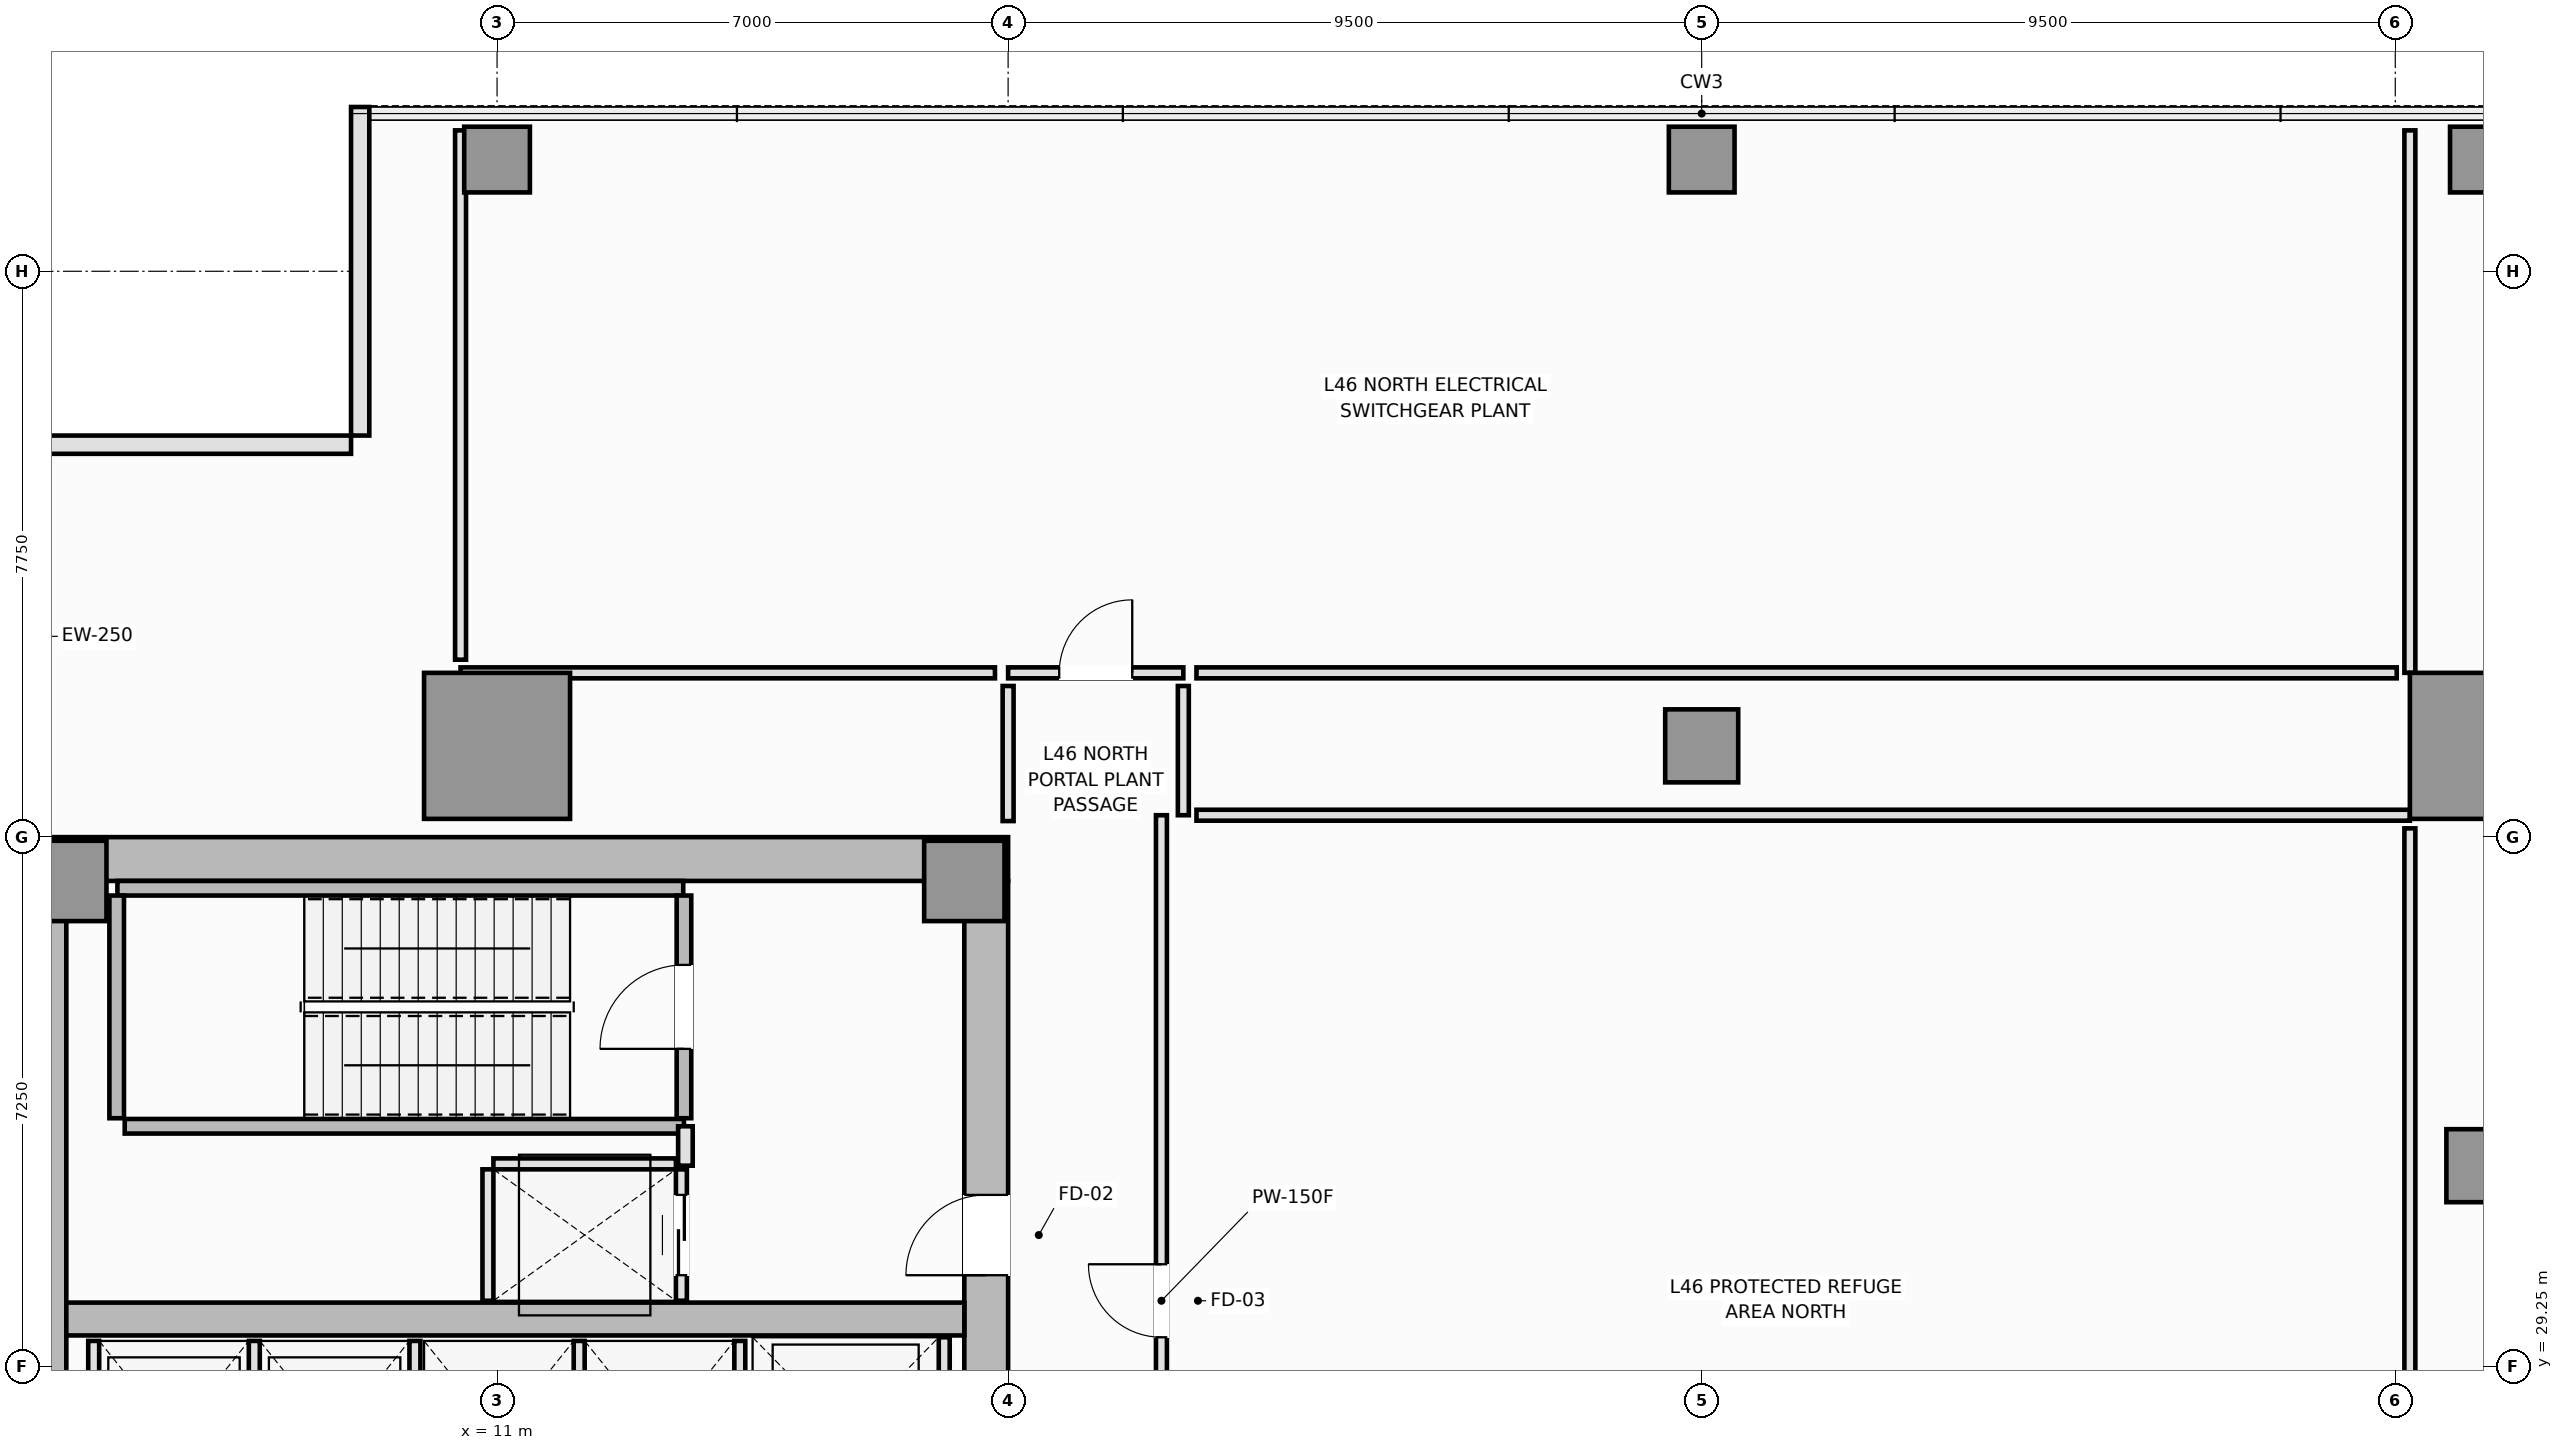
"""IFC4 building model, lengths in metres.
Left out: names, types, materials, properties, quantities, classifications, styles, units other than length and angle.
Written with IfcOpenShell. Run it as: python <this file> out.ifc"""

import sys

from ifc_helpers import new_model, si_unit, direction, frame, frame_2d, origin, origin_2d, place, context, subcontext, project, spatial, rectangle, extrude, element, fill, save


model = new_model("IFC4")
c1 = context("Model", 3, precision=1e-05, world=origin(), true_north=direction((0.0, 1.0)))
c2 = subcontext(c1, "Body", "Model", "MODEL_VIEW")
j1 = project(units=[si_unit("LENGTHUNIT", "METRE"), si_unit("PLANEANGLEUNIT", "RADIAN")], contexts=[c1])
p1 = place(None, origin())
s1 = spatial("IfcSite", under=j1, at=p1, CompositionType="ELEMENT")
p2 = place(p1, origin())
s2 = spatial("IfcBuilding", under=s1, at=p2, CompositionType="ELEMENT")
p3 = place(p2, frame((0.0, 0.0, 173.25)))
s3 = spatial("IfcBuildingStorey", under=s2, at=p3, CompositionType="ELEMENT", Elevation=173.25)
p4 = place(p3, frame((4.5, 36.2, 0.0), z_axis=(0.0, 0.0, 1.0), x_axis=(1.0, 0.0, 0.0)))
e1 = element("IfcWall", 1, at=p4, inside=s3, PredefinedType="SHEAR", context=c2, shape_type="SweptSolid", body=[
    extrude(rectangle(XDim=13.5, YDim=0.6, at=frame_2d((6.75, 0.0))), origin(), (0.0, 0.0, 1.0), 4.8),
])
p5 = place(p3, frame((4.8, 14.6, 0.0), z_axis=(0.0, 0.0, 1.0), x_axis=(0.0, 1.0, 0.0)))
e2 = element("IfcWall", 2, at=p5, inside=s3, PredefinedType="SHEAR", context=c2, shape_type="SweptSolid", body=[
    extrude(rectangle(XDim=21.3, YDim=0.6, at=frame_2d((10.65, 0.0))), origin(), (0.0, 0.0, 1.0), 4.8),
])
p6 = place(p3, frame((17.7, 27.05, 0.0), z_axis=(0.0, 0.0, 1.0), x_axis=(0.0, 1.0, 0.0)))
e3 = element("IfcWall", 3, at=p6, inside=s3, PredefinedType="SHEAR", context=c2, shape_type="SweptSolid", body=[
    extrude(rectangle(XDim=8.85, YDim=0.6, at=frame_2d((4.425, 0.0))), origin(), (0.0, 0.0, 1.0), 4.8),
])
p7 = place(p6, frame((3.45, 0.0, 0.0)))
e4 = element("IfcOpeningElement", 4, at=p7, cuts=e3, PredefinedType="OPENING", context=c2, shape_type="SweptSolid", body=[
    extrude(rectangle(XDim=1.1, YDim=2.15, at=frame_2d((0.55, 1.075))), frame((0.0, 0.31, 0.0), z_axis=(0.0, -1.0, 0.0), x_axis=(1.0, 0.0, 0.0)), (0.0, 0.0, 1.0), 0.62),
])
p8 = place(p3, frame((5.1, 29.9, 0.0), z_axis=(0.0, 0.0, 1.0), x_axis=(1.0, 0.0, 0.0)))
e5 = element("IfcWall", 5, at=p8, inside=s3, PredefinedType="SHEAR", context=c2, shape_type="SweptSolid", body=[
    extrude(rectangle(XDim=12.3, YDim=0.45, at=frame_2d((6.15, 0.0))), origin(), (0.0, 0.0, 1.0), 4.8),
])
for number, where, z_axis, x_axis in (
    (6, (5.1, 35.9, 0.0), (0.0, 0.0, 1.0), (1.0, 0.0, 0.0)),
    (7, (17.4, 35.9, 0.0), (0.0, 0.0, 1.0), (1.0, 0.0, 0.0)),
):
    element("IfcColumn", number, at=place(p3, frame(where, z_axis=z_axis, x_axis=x_axis)), inside=s3, PredefinedType="PILASTER", context=c2, shape_type="SweptSolid", body=[
        extrude(rectangle(XDim=1.1, YDim=1.1, at=origin_2d()), origin(), (0.0, 0.0, 1.0), 4.8),
    ])
for number, where, z_axis, x_axis in (
    (8, (11.0, 37.75, 0.0), (0.0, 0.0, 1.0), (1.0, 0.0, 0.0)),
    (9, (38.2, 37.75, 0.0), (0.0, 0.0, 1.0), (1.0, 0.0, 0.0)),
):
    element("IfcColumn", number, at=place(p3, frame(where, z_axis=z_axis, x_axis=x_axis)), inside=s3, PredefinedType="COLUMN", context=c2, shape_type="SweptSolid", body=[
        extrude(rectangle(XDim=2.0, YDim=2.0, at=origin_2d()), origin(), (0.0, 0.0, 1.0), 4.8),
    ])
for number, where, z_axis, x_axis in (
    (10, (27.5, 37.75, 0.0), (0.0, 0.0, 1.0), (1.0, 0.0, 0.0)),
    (11, (38.2, 32.0, 0.0), (0.0, 0.0, 1.0), (1.0, 0.0, 0.0)),
):
    element("IfcColumn", number, at=place(p3, frame(where, z_axis=z_axis, x_axis=x_axis)), inside=s3, PredefinedType="COLUMN", context=c2, shape_type="SweptSolid", body=[
        extrude(rectangle(XDim=1.0, YDim=1.0, at=origin_2d()), origin(), (0.0, 0.0, 1.0), 4.8),
    ])
for number, where, z_axis, x_axis in (
    (12, (11.0, 45.78, 0.0), (0.0, 0.0, 1.0), (1.0, 0.0, 0.0)),
    (13, (27.5, 45.78, 0.0), (0.0, 0.0, 1.0), (1.0, 0.0, 0.0)),
    (14, (38.2, 45.78, 0.0), (0.0, 0.0, 1.0), (1.0, 0.0, 0.0)),
):
    element("IfcColumn", number, at=place(p3, frame(where, z_axis=z_axis, x_axis=x_axis)), inside=s3, PredefinedType="COLUMN", context=c2, shape_type="SweptSolid", body=[
        extrude(rectangle(XDim=0.9, YDim=0.9, at=origin_2d()), origin(), (0.0, 0.0, 1.0), 4.8),
    ])
for number, where, z_axis, x_axis in (
    (15, (9.125, 46.5, 0.0), (0.0, 0.0, 1.0), (0.0, -1.0, 0.0)),
    (16, (9.0, 41.875, 0.0), (0.0, 0.0, 1.0), (-1.0, 0.0, 0.0)),
):
    element("IfcWall", number, at=place(p3, frame(where, z_axis=z_axis, x_axis=x_axis)), inside=s3, PredefinedType="SOLIDWALL", context=c2, shape_type="SweptSolid", body=[
        extrude(rectangle(XDim=4.5, YDim=0.25, at=frame_2d((2.25, 0.0))), origin(), (0.0, 0.0, 1.0), 4.6),
    ])
p9 = place(p3, frame((5.8, 35.8, 0.0), z_axis=(0.0, 0.0, 1.0), x_axis=(1.0, 0.0, 0.0)))
e17 = element("IfcWall", 17, at=p9, inside=s3, PredefinedType="SOLIDWALL", context=c2, shape_type="SweptSolid", body=[
    extrude(rectangle(XDim=7.75, YDim=0.2, at=frame_2d((3.875, 0.0))), origin(), (0.0, 0.0, 1.0), 4.8),
])
p10 = place(p3, frame((5.79, 32.65, 0.0), z_axis=(0.0, 0.0, 1.0), x_axis=(0.0, 1.0, 0.0)))
e18 = element("IfcWall", 18, at=p10, inside=s3, PredefinedType="SOLIDWALL", context=c2, shape_type="SweptSolid", body=[
    extrude(rectangle(XDim=3.05, YDim=0.2, at=frame_2d((1.525, 0.0))), origin(), (0.0, 0.0, 1.0), 4.8),
])
p11 = place(p3, frame((5.9, 32.54, 0.0), z_axis=(0.0, 0.0, 1.0), x_axis=(1.0, 0.0, 0.0)))
e19 = element("IfcWall", 19, at=p11, inside=s3, PredefinedType="SOLIDWALL", context=c2, shape_type="SweptSolid", body=[
    extrude(rectangle(XDim=7.66, YDim=0.2, at=frame_2d((3.83, 0.0))), origin(), (0.0, 0.0, 1.0), 4.8),
])
p12 = place(p3, frame((13.56, 32.65, 0.0), z_axis=(0.0, 0.0, 1.0), x_axis=(0.0, 1.0, 0.0)))
e20 = element("IfcWall", 20, at=p12, inside=s3, PredefinedType="SOLIDWALL", context=c2, shape_type="SweptSolid", body=[
    extrude(rectangle(XDim=3.05, YDim=0.2, at=frame_2d((1.525, 0.0))), origin(), (0.0, 0.0, 1.0), 4.8),
])
p13 = place(p12, frame((0.95, 0.0, 0.0)))
e21 = element("IfcOpeningElement", 21, at=p13, cuts=e20, PredefinedType="OPENING", context=c2, shape_type="SweptSolid", body=[
    extrude(rectangle(XDim=1.15, YDim=2.15, at=frame_2d((0.575, 1.075))), frame((0.0, 0.11, 0.0), z_axis=(0.0, -1.0, 0.0), x_axis=(1.0, 0.0, 0.0)), (0.0, 0.0, 1.0), 0.22),
])
for number, where, z_axis, x_axis in (
    (22, (5.475, 27.05, 0.0), (0.0, 0.0, 1.0), (0.0, 1.0, 0.0)),
    (23, (7.675, 27.05, 0.0), (0.0, 0.0, 1.0), (0.0, 1.0, 0.0)),
    (24, (9.875, 27.05, 0.0), (0.0, 0.0, 1.0), (0.0, 1.0, 0.0)),
    (25, (12.125, 27.05, 0.0), (0.0, 0.0, 1.0), (0.0, 1.0, 0.0)),
    (26, (14.325, 27.05, 0.0), (0.0, 0.0, 1.0), (0.0, 1.0, 0.0)),
):
    element("IfcWall", number, at=place(p3, frame(where, z_axis=z_axis, x_axis=x_axis)), inside=s3, PredefinedType="PARTITIONING", context=c2, shape_type="SweptSolid", body=[
        extrude(rectangle(XDim=2.55, YDim=0.15, at=frame_2d((1.275, 0.0))), origin(), (0.0, 0.0, 1.0), 4.6),
    ])
p14 = place(p3, frame((17.125, 27.05, 0.0), z_axis=(0.0, 0.0, 1.0), x_axis=(0.0, 1.0, 0.0)))
e27 = element("IfcWall", 27, at=p14, inside=s3, PredefinedType="PARTITIONING", context=c2, shape_type="SweptSolid", body=[
    extrude(rectangle(XDim=2.6, YDim=0.15, at=frame_2d((1.3, 0.0))), origin(), (0.0, 0.0, 1.0), 4.6),
])
p15 = place(p3, frame((10.95, 32.025, 0.0), z_axis=(0.0, 0.0, 1.0), x_axis=(1.0, 0.0, 0.0)))
e28 = element("IfcWall", 28, at=p15, inside=s3, PredefinedType="PARTITIONING", context=c2, shape_type="SweptSolid", body=[
    extrude(rectangle(XDim=2.5, YDim=0.15, at=frame_2d((1.25, 0.0))), origin(), (0.0, 0.0, 1.0), 4.6),
])
p16 = place(p3, frame((10.875, 30.15, 0.0), z_axis=(0.0, 0.0, 1.0), x_axis=(0.0, 1.0, 0.0)))
e29 = element("IfcWall", 29, at=p16, inside=s3, PredefinedType="PARTITIONING", context=c2, shape_type="SweptSolid", body=[
    extrude(rectangle(XDim=1.8, YDim=0.15, at=frame_2d((0.9, 0.0))), origin(), (0.0, 0.0, 1.0), 4.6),
])
p17 = place(p3, frame((13.525, 30.15, 0.0), z_axis=(0.0, 0.0, 1.0), x_axis=(0.0, 1.0, 0.0)))
e30 = element("IfcWall", 30, at=p17, inside=s3, PredefinedType="PARTITIONING", context=c2, shape_type="SweptSolid", body=[
    extrude(rectangle(XDim=1.8, YDim=0.15, at=frame_2d((0.9, 0.0))), origin(), (0.0, 0.0, 1.0), 4.6),
])
p18 = place(p17, frame((0.35, 0.0, 0.0)))
e31 = element("IfcOpeningElement", 31, at=p18, cuts=e30, PredefinedType="OPENING", context=c2, shape_type="SweptSolid", body=[
    extrude(rectangle(XDim=1.1, YDim=2.2, at=frame_2d((0.55, 1.1))), frame((0.0, 0.085, 0.0), z_axis=(0.0, -1.0, 0.0), x_axis=(1.0, 0.0, 0.0)), (0.0, 0.0, 1.0), 0.17),
])
p19 = place(p3, frame((13.58, 32.0, 0.0), z_axis=(0.0, 0.0, 1.0), x_axis=(0.0, 1.0, 0.0)))
e32 = element("IfcWall", 32, at=p19, inside=s3, PredefinedType="PARTITIONING", context=c2, shape_type="SweptSolid", body=[
    extrude(rectangle(XDim=0.54, YDim=0.2, at=frame_2d((0.27, 0.0))), origin(), (0.0, 0.0, 1.0), 4.6),
])
p20 = place(p3, frame((20.1, 23.5, 0.0), z_axis=(0.0, 0.0, 1.0), x_axis=(0.0, 1.0, 0.0)))
e33 = element("IfcWall", 33, at=p20, inside=s3, PredefinedType="PARTITIONING", context=c2, shape_type="SweptSolid", body=[
    extrude(rectangle(XDim=13.3, YDim=0.15, at=frame_2d((6.65, 0.0))), origin(), (0.0, 0.0, 1.0), 4.6),
])
p21 = place(p20, frame((6.15, 0.0, 0.0)))
e34 = element("IfcOpeningElement", 34, at=p21, cuts=e33, PredefinedType="OPENING", context=c2, shape_type="SweptSolid", body=[
    extrude(rectangle(XDim=1.0, YDim=2.15, at=frame_2d((0.5, 1.075))), frame((0.0, 0.085, 0.0), z_axis=(0.0, -1.0, 0.0), x_axis=(1.0, 0.0, 0.0)), (0.0, 0.0, 1.0), 0.17),
])
p22 = place(p3, frame((18.0, 38.75, 0.0), z_axis=(0.0, 0.0, 1.0), x_axis=(1.0, 0.0, 0.0)))
e35 = element("IfcWall", 35, at=p22, inside=s3, PredefinedType="PARTITIONING", context=c2, shape_type="SweptSolid", body=[
    extrude(rectangle(XDim=2.4, YDim=0.15, at=frame_2d((1.2, 0.0))), origin(), (0.0, 0.0, 1.0), 4.6),
])
p23 = place(p22, frame((0.7, 0.0, 0.0)))
e36 = element("IfcOpeningElement", 36, at=p23, cuts=e35, PredefinedType="OPENING", context=c2, shape_type="SweptSolid", body=[
    extrude(rectangle(XDim=1.0, YDim=2.15, at=frame_2d((0.5, 1.075))), frame((0.0, 0.085, 0.0), z_axis=(0.0, -1.0, 0.0), x_axis=(1.0, 0.0, 0.0)), (0.0, 0.0, 1.0), 0.17),
])
p24 = place(p3, frame((17.82, 38.75, 0.0), z_axis=(0.0, 0.0, 1.0), x_axis=(-1.0, 0.0, 0.0)))
e37 = element("IfcWall", 37, at=p24, inside=s3, PredefinedType="PARTITIONING", context=c2, shape_type="SweptSolid", body=[
    extrude(rectangle(XDim=7.32, YDim=0.15, at=frame_2d((3.66, 0.0))), origin(), (0.0, 0.0, 1.0), 4.6),
])
p25 = place(p3, frame((10.5, 38.93, 0.0), z_axis=(0.0, 0.0, 1.0), x_axis=(0.0, 1.0, 0.0)))
e38 = element("IfcWall", 38, at=p25, inside=s3, PredefinedType="PARTITIONING", context=c2, shape_type="SweptSolid", body=[
    extrude(rectangle(XDim=7.25, YDim=0.15, at=frame_2d((3.625, 0.0))), origin(), (0.0, 0.0, 1.0), 2.6),
])
p26 = place(p3, frame((37.2, 46.18, 0.0), z_axis=(0.0, 0.0, 1.0), x_axis=(0.0, -1.0, 0.0)))
e39 = element("IfcWall", 39, at=p26, inside=s3, PredefinedType="PARTITIONING", context=c2, shape_type="SweptSolid", body=[
    extrude(rectangle(XDim=7.43, YDim=0.15, at=frame_2d((3.715, 0.0))), origin(), (0.0, 0.0, 1.0), 4.6),
])
p27 = place(p3, frame((37.02, 38.75, 0.0), z_axis=(0.0, 0.0, 1.0), x_axis=(-1.0, 0.0, 0.0)))
e40 = element("IfcWall", 40, at=p27, inside=s3, PredefinedType="PARTITIONING", context=c2, shape_type="SweptSolid", body=[
    extrude(rectangle(XDim=16.44, YDim=0.15, at=frame_2d((8.22, 0.0))), origin(), (0.0, 0.0, 1.0), 4.6),
])
p28 = place(p3, frame((20.4, 38.57, 0.0), z_axis=(0.0, 0.0, 1.0), x_axis=(0.0, -1.0, 0.0)))
e41 = element("IfcWall", 41, at=p28, inside=s3, PredefinedType="PARTITIONING", context=c2, shape_type="SweptSolid", body=[
    extrude(rectangle(XDim=1.77, YDim=0.15, at=frame_2d((0.885, 0.0))), origin(), (0.0, 0.0, 1.0), 4.6),
])
p29 = place(p3, frame((20.58, 36.8, 0.0), z_axis=(0.0, 0.0, 1.0), x_axis=(1.0, 0.0, 0.0)))
e42 = element("IfcWall", 42, at=p29, inside=s3, PredefinedType="PARTITIONING", context=c2, shape_type="SweptSolid", body=[
    extrude(rectangle(XDim=16.62, YDim=0.15, at=frame_2d((8.31, 0.0))), origin(), (0.0, 0.0, 1.0), 4.6),
])
p30 = place(p3, frame((37.2, 36.62, 0.0), z_axis=(0.0, 0.0, 1.0), x_axis=(0.0, -1.0, 0.0)))
e43 = element("IfcWall", 43, at=p30, inside=s3, PredefinedType="PARTITIONING", context=c2, shape_type="SweptSolid", body=[
    extrude(rectangle(XDim=12.94, YDim=0.15, at=frame_2d((6.47, 0.0))), origin(), (0.0, 0.0, 1.0), 4.6),
])
p31 = place(p3, frame((18.0, 36.72, 0.0), z_axis=(0.0, 0.0, 1.0), x_axis=(0.0, 1.0, 0.0)))
e44 = element("IfcWall", 44, at=p31, inside=s3, PredefinedType="PARTITIONING", context=c2, shape_type="SweptSolid", body=[
    extrude(rectangle(XDim=1.85, YDim=0.15, at=frame_2d((0.925, 0.0))), origin(), (0.0, 0.0, 1.0), 4.6),
])
p32 = place(p13, origin())
e45 = element("IfcDoor", 45, at=p32, inside=s3, OperationType="SINGLE_SWING_LEFT", PredefinedType="DOOR", context=c2, shape_type="SweptSolid", body=[
    extrude(rectangle(XDim=1.15, YDim=2.15, at=frame_2d((0.575, 1.075))), frame((0.0, 0.025, 0.0), z_axis=(0.0, -1.0, 0.0), x_axis=(1.0, 0.0, 0.0)), (0.0, 0.0, 1.0), 0.05),
])
fill(e21, e45)
p33 = place(p18, origin())
e46 = element("IfcDoor", 46, at=p33, inside=s3, OperationType="DOUBLE_DOOR_SLIDING", PredefinedType="DOOR", context=c2, shape_type="SweptSolid", body=[
    extrude(rectangle(XDim=1.1, YDim=2.2, at=frame_2d((0.55, 1.1))), frame((0.0, 0.025, 0.0), z_axis=(0.0, -1.0, 0.0), x_axis=(1.0, 0.0, 0.0)), (0.0, 0.0, 1.0), 0.05),
])
fill(e31, e46)
p34 = place(p7, origin())
e47 = element("IfcDoor", 47, at=p34, inside=s3, OperationType="SINGLE_SWING_LEFT", PredefinedType="DOOR", context=c2, shape_type="SweptSolid", body=[
    extrude(rectangle(XDim=1.1, YDim=2.15, at=frame_2d((0.55, 1.075))), frame((0.0, 0.025, 0.0), z_axis=(0.0, -1.0, 0.0), x_axis=(1.0, 0.0, 0.0)), (0.0, 0.0, 1.0), 0.05),
])
fill(e4, e47)
p35 = place(p21, origin())
e48 = element("IfcDoor", 48, at=p35, inside=s3, OperationType="SINGLE_SWING_RIGHT", PredefinedType="DOOR", context=c2, shape_type="SweptSolid", body=[
    extrude(rectangle(XDim=1.0, YDim=2.15, at=frame_2d((0.5, 1.075))), frame((0.0, 0.025, 0.0), z_axis=(0.0, -1.0, 0.0), x_axis=(1.0, 0.0, 0.0)), (0.0, 0.0, 1.0), 0.05),
])
fill(e34, e48)
p36 = place(p23, origin())
e49 = element("IfcDoor", 49, at=p36, inside=s3, OperationType="SINGLE_SWING_RIGHT", PredefinedType="DOOR", context=c2, shape_type="SweptSolid", body=[
    extrude(rectangle(XDim=1.0, YDim=2.15, at=frame_2d((0.5, 1.075))), frame((0.0, 0.025, 0.0), z_axis=(0.0, -1.0, 0.0), x_axis=(1.0, 0.0, 0.0)), (0.0, 0.0, 1.0), 0.05),
])
fill(e36, e49)
save(model, sys.argv[1])
